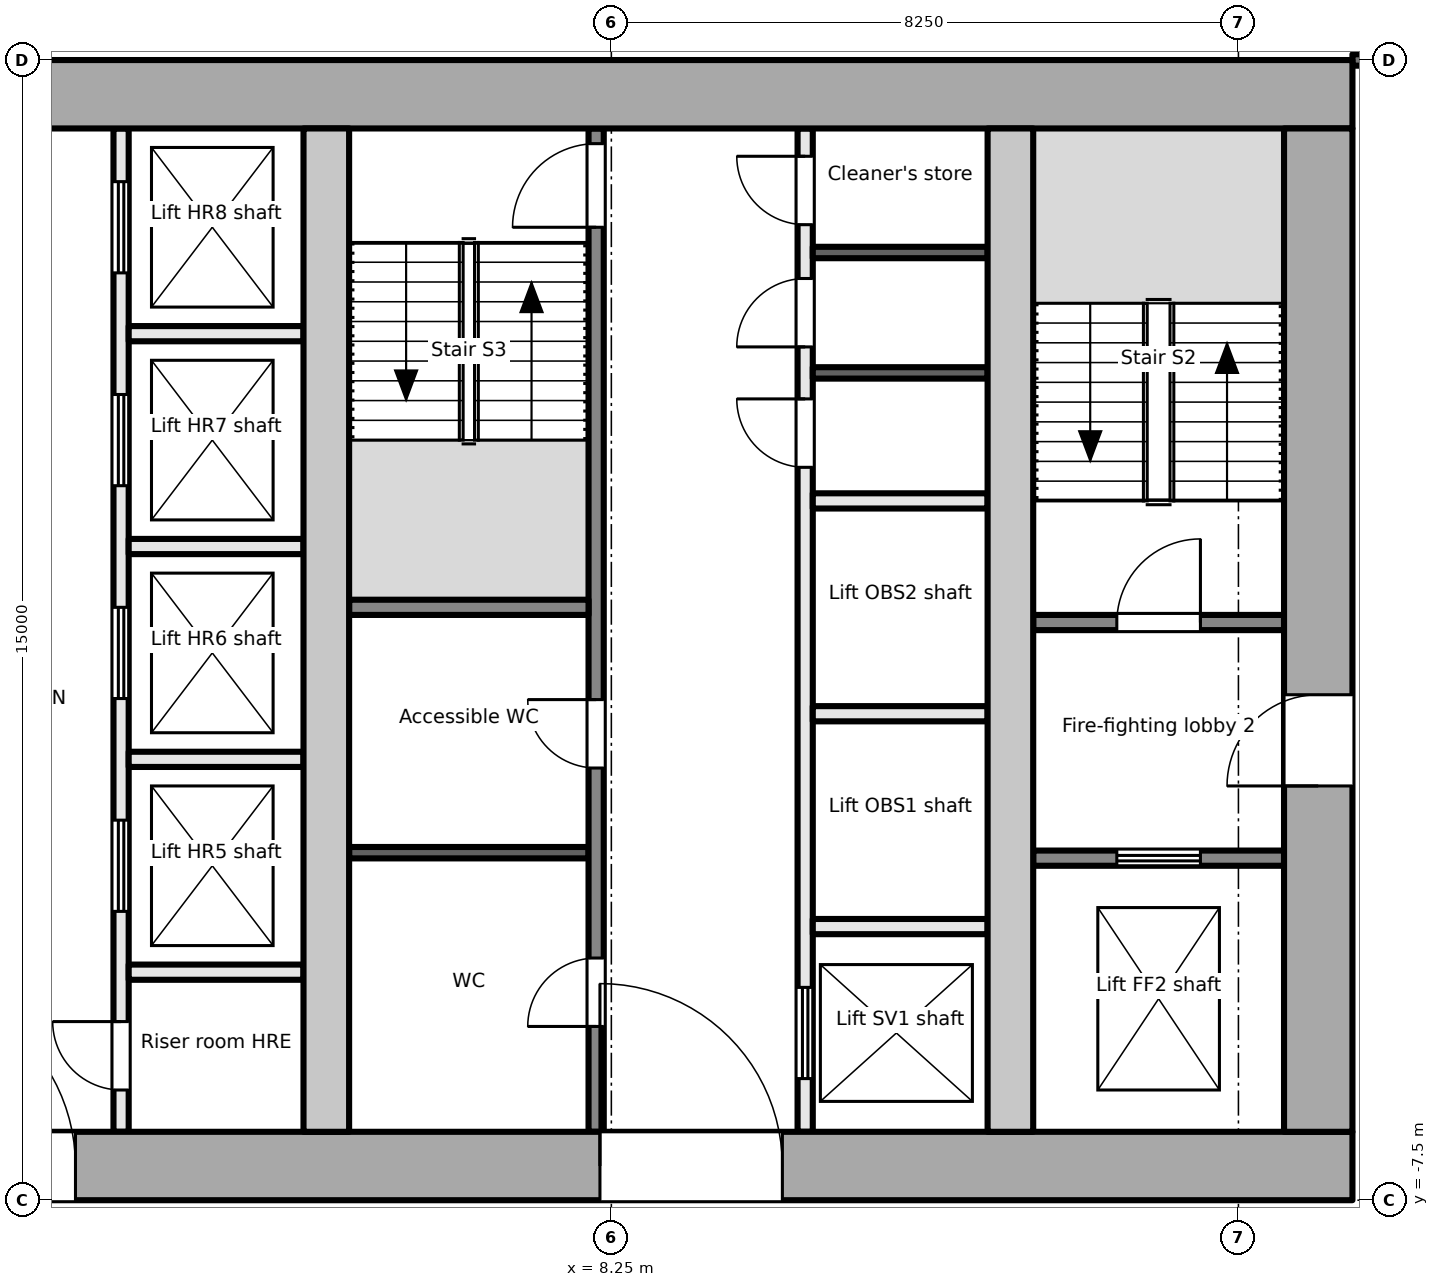
"""IFC4 building model, lengths in metres.
Left out: names, types, materials, properties, quantities, classifications, styles, units other than length and angle.
Written with IfcOpenShell. Run it as: python <this file> out.ifc"""

import sys

from ifc_helpers import new_model, si_unit, direction, frame, frame_2d, origin, place, context, subcontext, project, spatial, rectangle, extrude, element, fill, save


model = new_model("IFC4")
c1 = context("Model", 3, precision=1e-05, world=origin(), true_north=direction((0.0, 1.0)))
c2 = subcontext(c1, "Body", "Model", "MODEL_VIEW")
j1 = project(units=[si_unit("LENGTHUNIT", "METRE"), si_unit("PLANEANGLEUNIT", "RADIAN")], contexts=[c1])
p1 = place(None, origin())
s1 = spatial("IfcSite", under=j1, at=p1, CompositionType="ELEMENT")
p2 = place(p1, origin())
s2 = spatial("IfcBuilding", under=s1, at=p2, CompositionType="ELEMENT")
p3 = place(p2, frame((0.0, 0.0, 188.0)))
s3 = spatial("IfcBuildingStorey", under=s2, at=p3, CompositionType="ELEMENT", Elevation=188.0)
p4 = place(p3, frame((-18.0, -7.05, -0.2), z_axis=(0.0, 0.0, 1.0), x_axis=(1.0, 0.0, 0.0)))
e1 = element("IfcWall", 1, at=p4, inside=s3, PredefinedType="SHEAR", context=c2, shape_type="SweptSolid", body=[
    extrude(rectangle(XDim=36.0, YDim=0.9, at=frame_2d((18.0, 0.0))), origin(), (0.0, 0.0, 1.0), 3.9),
])
p5 = place(p4, frame((11.3, 0.0, 0.2)))
e2 = element("IfcOpeningElement", 2, at=p5, cuts=e1, PredefinedType="OPENING", context=c2, shape_type="SweptSolid", body=[
    extrude(rectangle(XDim=1.8, YDim=2.1, at=frame_2d((0.9, 1.05))), frame((0.0, 0.46, 0.0), z_axis=(0.0, -1.0, 0.0), x_axis=(1.0, 0.0, 0.0)), (0.0, 0.0, 1.0), 0.921),
])
p6 = place(p4, frame((16.8, 0.0, 0.2)))
e3 = element("IfcOpeningElement", 3, at=p6, cuts=e1, PredefinedType="OPENING", context=c2, shape_type="SweptSolid", body=[
    extrude(rectangle(XDim=2.4, YDim=2.1, at=frame_2d((1.2, 1.05))), frame((0.0, 0.46, 0.0), z_axis=(0.0, -1.0, 0.0), x_axis=(1.0, 0.0, 0.0)), (0.0, 0.0, 1.0), 0.921),
])
p7 = place(p4, frame((26.1, 0.0, 0.2)))
e4 = element("IfcOpeningElement", 4, at=p7, cuts=e1, PredefinedType="OPENING", context=c2, shape_type="SweptSolid", body=[
    extrude(rectangle(XDim=2.4, YDim=2.1, at=frame_2d((1.2, 1.05))), frame((0.0, 0.46, 0.0), z_axis=(0.0, -1.0, 0.0), x_axis=(1.0, 0.0, 0.0)), (0.0, 0.0, 1.0), 0.921),
])
p8 = place(p3, frame((-18.0, 7.05, -0.2), z_axis=(0.0, 0.0, 1.0), x_axis=(1.0, 0.0, 0.0)))
e5 = element("IfcWall", 5, at=p8, inside=s3, PredefinedType="SHEAR", context=c2, shape_type="SweptSolid", body=[
    extrude(rectangle(XDim=36.0, YDim=0.9, at=frame_2d((18.0, 0.0))), origin(), (0.0, 0.0, 1.0), 3.9),
])
p9 = place(p3, frame((17.55, -6.6, -0.2), z_axis=(0.0, 0.0, 1.0), x_axis=(0.0, 1.0, 0.0)))
e6 = element("IfcWall", 6, at=p9, inside=s3, PredefinedType="SHEAR", context=c2, shape_type="SweptSolid", body=[
    extrude(rectangle(XDim=13.2, YDim=0.9, at=frame_2d((6.6, 0.0))), origin(), (0.0, 0.0, 1.0), 3.9),
])
p10 = place(p9, frame((4.55, 0.0, 0.2)))
e7 = element("IfcOpeningElement", 7, at=p10, cuts=e6, PredefinedType="OPENING", context=c2, shape_type="SweptSolid", body=[
    extrude(rectangle(XDim=1.2, YDim=2.1, at=frame_2d((0.6, 1.05))), frame((0.0, 0.46, 0.0), z_axis=(0.0, -1.0, 0.0), x_axis=(1.0, 0.0, 0.0)), (0.0, 0.0, 1.0), 0.921),
])
for number, where, z_axis, x_axis in (
    (8, (4.5, -6.6, -0.2), (0.0, 0.0, 1.0), (0.0, 1.0, 0.0)),
    (9, (13.5, -6.6, -0.2), (0.0, 0.0, 1.0), (0.0, 1.0, 0.0)),
):
    element("IfcWall", number, at=place(p3, frame(where, z_axis=z_axis, x_axis=x_axis)), inside=s3, PredefinedType="SHEAR", context=c2, shape_type="SweptSolid", body=[
        extrude(rectangle(XDim=13.2, YDim=0.6, at=frame_2d((6.6, 0.0))), origin(), (0.0, 0.0, 1.0), 3.9),
    ])
p11 = place(p3, frame((13.8, -3.0, 0.0), z_axis=(0.0, 0.0, 1.0), x_axis=(1.0, 0.0, 0.0)))
e10 = element("IfcWall", 10, at=p11, inside=s3, PredefinedType="PARTITIONING", context=c2, shape_type="SweptSolid", body=[
    extrude(rectangle(XDim=3.3, YDim=0.2, at=frame_2d((1.65, 0.0))), origin(), (0.0, 0.0, 1.0), 3.7),
])
p12 = place(p11, frame((1.1, 0.0, 0.0)))
e11 = element("IfcOpeningElement", 11, at=p12, cuts=e10, PredefinedType="OPENING", context=c2, shape_type="SweptSolid", body=[
    extrude(rectangle(XDim=1.1, YDim=2.1, at=frame_2d((0.55, 1.05))), frame((0.0, 0.111, 0.0), z_axis=(0.0, -1.0, 0.0), x_axis=(1.0, 0.0, 0.0)), (0.0, 0.0, 1.0), 0.221),
])
p13 = place(p3, frame((13.8, 0.1, 0.0), z_axis=(0.0, 0.0, 1.0), x_axis=(1.0, 0.0, 0.0)))
e12 = element("IfcWall", 12, at=p13, inside=s3, PredefinedType="PARTITIONING", context=c2, shape_type="SweptSolid", body=[
    extrude(rectangle(XDim=3.3, YDim=0.2, at=frame_2d((1.65, 0.0))), origin(), (0.0, 0.0, 1.0), 3.7),
])
p14 = place(p13, frame((1.1, 0.0, 0.0)))
e13 = element("IfcOpeningElement", 13, at=p14, cuts=e12, PredefinedType="OPENING", context=c2, shape_type="SweptSolid", body=[
    extrude(rectangle(XDim=1.1, YDim=2.1, at=frame_2d((0.55, 1.05))), frame((0.0, 0.111, 0.0), z_axis=(0.0, -1.0, 0.0), x_axis=(1.0, 0.0, 0.0)), (0.0, 0.0, 1.0), 0.221),
])
p15 = place(p3, frame((1.8, -6.6, 0.0), z_axis=(0.0, 0.0, 1.0), x_axis=(0.0, 1.0, 0.0)))
e14 = element("IfcWall", 14, at=p15, inside=s3, PredefinedType="PARTITIONING", context=c2, shape_type="SweptSolid", body=[
    extrude(rectangle(XDim=13.2, YDim=0.2, at=frame_2d((6.6, 0.0))), origin(), (0.0, 0.0, 1.0), 3.7),
])
p16 = place(p15, frame((0.55, 0.0, 0.0)))
e15 = element("IfcOpeningElement", 15, at=p16, cuts=e14, PredefinedType="OPENING", context=c2, shape_type="SweptSolid", body=[
    extrude(rectangle(XDim=0.9, YDim=2.1, at=frame_2d((0.45, 1.05))), frame((0.0, 0.111, 0.0), z_axis=(0.0, -1.0, 0.0), x_axis=(1.0, 0.0, 0.0)), (0.0, 0.0, 1.0), 0.221),
])
p17 = place(p15, frame((2.9, 0.0, 0.0)))
e16 = element("IfcOpeningElement", 16, at=p17, cuts=e14, PredefinedType="OPENING", context=c2, shape_type="SweptSolid", body=[
    extrude(rectangle(XDim=1.2, YDim=2.1, at=frame_2d((0.6, 1.05))), frame((0.0, 0.111, 0.0), z_axis=(0.0, -1.0, 0.0), x_axis=(1.0, 0.0, 0.0)), (0.0, 0.0, 1.0), 0.221),
])
p18 = place(p15, frame((5.7, 0.0, 0.0)))
e17 = element("IfcOpeningElement", 17, at=p18, cuts=e14, PredefinedType="OPENING", context=c2, shape_type="SweptSolid", body=[
    extrude(rectangle(XDim=1.2, YDim=2.1, at=frame_2d((0.6, 1.05))), frame((0.0, 0.111, 0.0), z_axis=(0.0, -1.0, 0.0), x_axis=(1.0, 0.0, 0.0)), (0.0, 0.0, 1.0), 0.221),
])
p19 = place(p15, frame((8.5, 0.0, 0.0)))
e18 = element("IfcOpeningElement", 18, at=p19, cuts=e14, PredefinedType="OPENING", context=c2, shape_type="SweptSolid", body=[
    extrude(rectangle(XDim=1.2, YDim=2.1, at=frame_2d((0.6, 1.05))), frame((0.0, 0.111, 0.0), z_axis=(0.0, -1.0, 0.0), x_axis=(1.0, 0.0, 0.0)), (0.0, 0.0, 1.0), 0.221),
])
p20 = place(p15, frame((11.3, 0.0, 0.0)))
e19 = element("IfcOpeningElement", 19, at=p20, cuts=e14, PredefinedType="OPENING", context=c2, shape_type="SweptSolid", body=[
    extrude(rectangle(XDim=1.2, YDim=2.1, at=frame_2d((0.6, 1.05))), frame((0.0, 0.111, 0.0), z_axis=(0.0, -1.0, 0.0), x_axis=(1.0, 0.0, 0.0)), (0.0, 0.0, 1.0), 0.221),
])
for number, where, z_axis, x_axis in (
    (20, (1.9, -1.7, 0.0), (0.0, 0.0, 1.0), (1.0, 0.0, 0.0)),
    (21, (1.9, 1.1, 0.0), (0.0, 0.0, 1.0), (1.0, 0.0, 0.0)),
    (22, (1.9, 3.9, 0.0), (0.0, 0.0, 1.0), (1.0, 0.0, 0.0)),
    (23, (1.9, -4.5, 0.0), (0.0, 0.0, 1.0), (1.0, 0.0, 0.0)),
):
    element("IfcWall", number, at=place(p3, frame(where, z_axis=z_axis, x_axis=x_axis)), inside=s3, PredefinedType="PARTITIONING", context=c2, shape_type="SweptSolid", body=[
        extrude(rectangle(XDim=2.3, YDim=0.2, at=frame_2d((1.15, 0.0))), origin(), (0.0, 0.0, 1.0), 3.7),
    ])
p21 = place(p3, frame((8.05, -6.6, 0.0), z_axis=(0.0, 0.0, 1.0), x_axis=(0.0, 1.0, 0.0)))
e24 = element("IfcWall", 24, at=p21, inside=s3, PredefinedType="PARTITIONING", context=c2, shape_type="SweptSolid", body=[
    extrude(rectangle(XDim=13.2, YDim=0.2, at=frame_2d((6.6, 0.0))), origin(), (0.0, 0.0, 1.0), 3.7),
])
p22 = place(p21, frame((1.386, 0.0, 0.0)))
e25 = element("IfcOpeningElement", 25, at=p22, cuts=e24, PredefinedType="OPENING", context=c2, shape_type="SweptSolid", body=[
    extrude(rectangle(XDim=0.9, YDim=2.1, at=frame_2d((0.45, 1.05))), frame((0.0, 0.111, 0.0), z_axis=(0.0, -1.0, 0.0), x_axis=(1.0, 0.0, 0.0)), (0.0, 0.0, 1.0), 0.221),
])
p23 = place(p21, frame((4.786, 0.0, 0.0)))
e26 = element("IfcOpeningElement", 26, at=p23, cuts=e24, PredefinedType="OPENING", context=c2, shape_type="SweptSolid", body=[
    extrude(rectangle(XDim=0.9, YDim=2.1, at=frame_2d((0.45, 1.05))), frame((0.0, 0.111, 0.0), z_axis=(0.0, -1.0, 0.0), x_axis=(1.0, 0.0, 0.0)), (0.0, 0.0, 1.0), 0.221),
])
p24 = place(p21, frame((11.9, 0.0, 0.0)))
e27 = element("IfcOpeningElement", 27, at=p24, cuts=e24, PredefinedType="OPENING", context=c2, shape_type="SweptSolid", body=[
    extrude(rectangle(XDim=1.1, YDim=2.1, at=frame_2d((0.55, 1.05))), frame((0.0, 0.111, 0.0), z_axis=(0.0, -1.0, 0.0), x_axis=(1.0, 0.0, 0.0)), (0.0, 0.0, 1.0), 0.221),
])
p25 = place(p3, frame((10.8, -6.6, 0.0), z_axis=(0.0, 0.0, 1.0), x_axis=(0.0, 1.0, 0.0)))
e28 = element("IfcWall", 28, at=p25, inside=s3, PredefinedType="PARTITIONING", context=c2, shape_type="SweptSolid", body=[
    extrude(rectangle(XDim=13.2, YDim=0.2, at=frame_2d((6.6, 0.0))), origin(), (0.0, 0.0, 1.0), 3.7),
])
p26 = place(p25, frame((0.7, 0.0, 0.0)))
e29 = element("IfcOpeningElement", 29, at=p26, cuts=e28, PredefinedType="OPENING", context=c2, shape_type="SweptSolid", body=[
    extrude(rectangle(XDim=1.2, YDim=2.1, at=frame_2d((0.6, 1.05))), frame((0.0, 0.111, 0.0), z_axis=(0.0, -1.0, 0.0), x_axis=(1.0, 0.0, 0.0)), (0.0, 0.0, 1.0), 0.221),
])
p27 = place(p25, frame((8.742, 0.0, 0.0)))
e30 = element("IfcOpeningElement", 30, at=p27, cuts=e28, PredefinedType="OPENING", context=c2, shape_type="SweptSolid", body=[
    extrude(rectangle(XDim=0.9, YDim=2.1, at=frame_2d((0.45, 1.05))), frame((0.0, 0.111, 0.0), z_axis=(0.0, -1.0, 0.0), x_axis=(1.0, 0.0, 0.0)), (0.0, 0.0, 1.0), 0.221),
])
p28 = place(p25, frame((10.326, 0.0, 0.0)))
e31 = element("IfcOpeningElement", 31, at=p28, cuts=e28, PredefinedType="OPENING", context=c2, shape_type="SweptSolid", body=[
    extrude(rectangle(XDim=0.9, YDim=2.1, at=frame_2d((0.45, 1.05))), frame((0.0, 0.111, 0.0), z_axis=(0.0, -1.0, 0.0), x_axis=(1.0, 0.0, 0.0)), (0.0, 0.0, 1.0), 0.221),
])
p29 = place(p25, frame((11.934, 0.0, 0.0)))
e32 = element("IfcOpeningElement", 32, at=p29, cuts=e28, PredefinedType="OPENING", context=c2, shape_type="SweptSolid", body=[
    extrude(rectangle(XDim=0.9, YDim=2.1, at=frame_2d((0.45, 1.05))), frame((0.0, 0.111, 0.0), z_axis=(0.0, -1.0, 0.0), x_axis=(1.0, 0.0, 0.0)), (0.0, 0.0, 1.0), 0.221),
])
p30 = place(p3, frame((4.8, 0.3, 0.0), z_axis=(0.0, 0.0, 1.0), x_axis=(1.0, 0.0, 0.0)))
e33 = element("IfcWall", 33, at=p30, inside=s3, PredefinedType="PARTITIONING", context=c2, shape_type="SweptSolid", body=[
    extrude(rectangle(XDim=3.15, YDim=0.2, at=frame_2d((1.575, 0.0))), origin(), (0.0, 0.0, 1.0), 3.7),
])
p31 = place(p3, frame((4.8, -2.928, 0.0), z_axis=(0.0, 0.0, 1.0), x_axis=(1.0, 0.0, 0.0)))
e34 = element("IfcWall", 34, at=p31, inside=s3, PredefinedType="PARTITIONING", context=c2, shape_type="SweptSolid", body=[
    extrude(rectangle(XDim=3.15, YDim=0.15, at=frame_2d((1.575, 0.0))), origin(), (0.0, 0.0, 1.0), 3.7),
])
for number, where, z_axis, x_axis in (
    (35, (10.9, -3.9, 0.0), (0.0, 0.0, 1.0), (1.0, 0.0, 0.0)),
    (36, (10.9, -1.1, 0.0), (0.0, 0.0, 1.0), (1.0, 0.0, 0.0)),
    (37, (10.9, 1.7, 0.0), (0.0, 0.0, 1.0), (1.0, 0.0, 0.0)),
):
    element("IfcWall", number, at=place(p3, frame(where, z_axis=z_axis, x_axis=x_axis)), inside=s3, PredefinedType="PARTITIONING", context=c2, shape_type="SweptSolid", body=[
        extrude(rectangle(XDim=2.3, YDim=0.2, at=frame_2d((1.15, 0.0))), origin(), (0.0, 0.0, 1.0), 3.7),
    ])
for number, where, z_axis, x_axis in (
    (38, (10.9, 3.384, 0.0), (0.0, 0.0, 1.0), (1.0, 0.0, 0.0)),
    (39, (10.9, 4.968, 0.0), (0.0, 0.0, 1.0), (1.0, 0.0, 0.0)),
):
    element("IfcWall", number, at=place(p3, frame(where, z_axis=z_axis, x_axis=x_axis)), inside=s3, PredefinedType="PARTITIONING", context=c2, shape_type="SweptSolid", body=[
        extrude(rectangle(XDim=2.3, YDim=0.15, at=frame_2d((1.15, 0.0))), origin(), (0.0, 0.0, 1.0), 3.7),
    ])
p32 = place(p3, frame((18.0, 7.501, 0.0), z_axis=(0.0, 0.0, 1.0), x_axis=(1.0, 0.0, 0.0)))
e40 = element("IfcWall", 40, at=p32, inside=s3, PredefinedType="PARTITIONING", context=c2, shape_type="SweptSolid", body=[
    extrude(rectangle(XDim=2.624, YDim=0.15, at=frame_2d((1.312, 0.0))), origin(), (0.0, 0.0, 1.0), 3.7),
])
p33 = place(p12, origin())
e41 = element("IfcDoor", 41, at=p33, inside=s3, OperationType="DOUBLE_DOOR_SLIDING", PredefinedType="DOOR", context=c2, shape_type="SweptSolid", body=[
    extrude(rectangle(XDim=1.1, YDim=2.1, at=frame_2d((0.55, 1.05))), frame((0.0, 0.025, 0.0), z_axis=(0.0, -1.0, 0.0), x_axis=(1.0, 0.0, 0.0)), (0.0, 0.0, 1.0), 0.05),
])
fill(e11, e41)
p34 = place(p10, origin())
e42 = element("IfcDoor", 42, at=p34, inside=s3, OperationType="SINGLE_SWING_LEFT", PredefinedType="DOOR", context=c2, shape_type="SweptSolid", body=[
    extrude(rectangle(XDim=1.2, YDim=2.1, at=frame_2d((0.6, 1.05))), frame((0.0, 0.025, 0.0), z_axis=(0.0, -1.0, 0.0), x_axis=(1.0, 0.0, 0.0)), (0.0, 0.0, 1.0), 0.05),
])
fill(e7, e42)
p35 = place(p14, origin())
e43 = element("IfcDoor", 43, at=p35, inside=s3, OperationType="SINGLE_SWING_RIGHT", PredefinedType="DOOR", context=c2, shape_type="SweptSolid", body=[
    extrude(rectangle(XDim=1.1, YDim=2.1, at=frame_2d((0.55, 1.05))), frame((0.0, 0.025, 0.0), z_axis=(0.0, -1.0, 0.0), x_axis=(1.0, 0.0, 0.0)), (0.0, 0.0, 1.0), 0.05),
])
fill(e13, e43)
p36 = place(p16, origin())
e44 = element("IfcDoor", 44, at=p36, inside=s3, OperationType="SINGLE_SWING_RIGHT", PredefinedType="DOOR", context=c2, shape_type="SweptSolid", body=[
    extrude(rectangle(XDim=0.9, YDim=2.1, at=frame_2d((0.45, 1.05))), frame((0.0, 0.025, 0.0), z_axis=(0.0, -1.0, 0.0), x_axis=(1.0, 0.0, 0.0)), (0.0, 0.0, 1.0), 0.05),
])
fill(e15, e44)
p37 = place(p17, origin())
e45 = element("IfcDoor", 45, at=p37, inside=s3, OperationType="DOUBLE_DOOR_SLIDING", PredefinedType="DOOR", context=c2, shape_type="SweptSolid", body=[
    extrude(rectangle(XDim=1.2, YDim=2.1, at=frame_2d((0.6, 1.05))), frame((0.0, 0.025, 0.0), z_axis=(0.0, -1.0, 0.0), x_axis=(1.0, 0.0, 0.0)), (0.0, 0.0, 1.0), 0.05),
])
fill(e16, e45)
p38 = place(p18, origin())
e46 = element("IfcDoor", 46, at=p38, inside=s3, OperationType="DOUBLE_DOOR_SLIDING", PredefinedType="DOOR", context=c2, shape_type="SweptSolid", body=[
    extrude(rectangle(XDim=1.2, YDim=2.1, at=frame_2d((0.6, 1.05))), frame((0.0, 0.025, 0.0), z_axis=(0.0, -1.0, 0.0), x_axis=(1.0, 0.0, 0.0)), (0.0, 0.0, 1.0), 0.05),
])
fill(e17, e46)
p39 = place(p19, origin())
e47 = element("IfcDoor", 47, at=p39, inside=s3, OperationType="DOUBLE_DOOR_SLIDING", PredefinedType="DOOR", context=c2, shape_type="SweptSolid", body=[
    extrude(rectangle(XDim=1.2, YDim=2.1, at=frame_2d((0.6, 1.05))), frame((0.0, 0.025, 0.0), z_axis=(0.0, -1.0, 0.0), x_axis=(1.0, 0.0, 0.0)), (0.0, 0.0, 1.0), 0.05),
])
fill(e18, e47)
p40 = place(p20, origin())
e48 = element("IfcDoor", 48, at=p40, inside=s3, OperationType="DOUBLE_DOOR_SLIDING", PredefinedType="DOOR", context=c2, shape_type="SweptSolid", body=[
    extrude(rectangle(XDim=1.2, YDim=2.1, at=frame_2d((0.6, 1.05))), frame((0.0, 0.025, 0.0), z_axis=(0.0, -1.0, 0.0), x_axis=(1.0, 0.0, 0.0)), (0.0, 0.0, 1.0), 0.05),
])
fill(e19, e48)
p41 = place(p6, origin())
e49 = element("IfcDoor", 49, at=p41, inside=s3, OperationType="DOUBLE_DOOR_DOUBLE_SWING", PredefinedType="DOOR", context=c2, shape_type="SweptSolid", body=[
    extrude(rectangle(XDim=2.4, YDim=2.1, at=frame_2d((1.2, 1.05))), frame((0.0, 0.025, 0.0), z_axis=(0.0, -1.0, 0.0), x_axis=(1.0, 0.0, 0.0)), (0.0, 0.0, 1.0), 0.05),
])
fill(e3, e49)
p42 = place(p22, origin())
e50 = element("IfcDoor", 50, at=p42, inside=s3, OperationType="SINGLE_SWING_LEFT", PredefinedType="DOOR", context=c2, shape_type="SweptSolid", body=[
    extrude(rectangle(XDim=0.9, YDim=2.1, at=frame_2d((0.45, 1.05))), frame((0.0, 0.025, 0.0), z_axis=(0.0, -1.0, 0.0), x_axis=(1.0, 0.0, 0.0)), (0.0, 0.0, 1.0), 0.05),
])
fill(e25, e50)
p43 = place(p23, origin())
e51 = element("IfcDoor", 51, at=p43, inside=s3, OperationType="SINGLE_SWING_RIGHT", PredefinedType="DOOR", context=c2, shape_type="SweptSolid", body=[
    extrude(rectangle(XDim=0.9, YDim=2.1, at=frame_2d((0.45, 1.05))), frame((0.0, 0.025, 0.0), z_axis=(0.0, -1.0, 0.0), x_axis=(1.0, 0.0, 0.0)), (0.0, 0.0, 1.0), 0.05),
])
fill(e26, e51)
p44 = place(p24, origin())
e52 = element("IfcDoor", 52, at=p44, inside=s3, OperationType="SINGLE_SWING_LEFT", PredefinedType="DOOR", context=c2, shape_type="SweptSolid", body=[
    extrude(rectangle(XDim=1.1, YDim=2.1, at=frame_2d((0.55, 1.05))), frame((0.0, 0.025, 0.0), z_axis=(0.0, -1.0, 0.0), x_axis=(1.0, 0.0, 0.0)), (0.0, 0.0, 1.0), 0.05),
])
fill(e27, e52)
p45 = place(p7, origin())
e53 = element("IfcDoor", 53, at=p45, inside=s3, OperationType="DOUBLE_DOOR_DOUBLE_SWING", PredefinedType="DOOR", context=c2, shape_type="SweptSolid", body=[
    extrude(rectangle(XDim=2.4, YDim=2.1, at=frame_2d((1.2, 1.05))), frame((0.0, 0.025, 0.0), z_axis=(0.0, -1.0, 0.0), x_axis=(1.0, 0.0, 0.0)), (0.0, 0.0, 1.0), 0.05),
])
fill(e4, e53)
p46 = place(p26, origin())
e54 = element("IfcDoor", 54, at=p46, inside=s3, OperationType="DOUBLE_DOOR_SLIDING", PredefinedType="DOOR", context=c2, shape_type="SweptSolid", body=[
    extrude(rectangle(XDim=1.2, YDim=2.1, at=frame_2d((0.6, 1.05))), frame((0.0, 0.025, 0.0), z_axis=(0.0, -1.0, 0.0), x_axis=(1.0, 0.0, 0.0)), (0.0, 0.0, 1.0), 0.05),
])
fill(e29, e54)
p47 = place(p27, origin())
e55 = element("IfcDoor", 55, at=p47, inside=s3, OperationType="SINGLE_SWING_RIGHT", PredefinedType="DOOR", context=c2, shape_type="SweptSolid", body=[
    extrude(rectangle(XDim=0.9, YDim=2.1, at=frame_2d((0.45, 1.05))), frame((0.0, 0.025, 0.0), z_axis=(0.0, -1.0, 0.0), x_axis=(1.0, 0.0, 0.0)), (0.0, 0.0, 1.0), 0.05),
])
fill(e30, e55)
p48 = place(p28, origin())
e56 = element("IfcDoor", 56, at=p48, inside=s3, OperationType="SINGLE_SWING_LEFT", PredefinedType="DOOR", context=c2, shape_type="SweptSolid", body=[
    extrude(rectangle(XDim=0.9, YDim=2.1, at=frame_2d((0.45, 1.05))), frame((0.0, 0.025, 0.0), z_axis=(0.0, -1.0, 0.0), x_axis=(1.0, 0.0, 0.0)), (0.0, 0.0, 1.0), 0.05),
])
fill(e31, e56)
p49 = place(p29, origin())
e57 = element("IfcDoor", 57, at=p49, inside=s3, OperationType="SINGLE_SWING_RIGHT", PredefinedType="DOOR", context=c2, shape_type="SweptSolid", body=[
    extrude(rectangle(XDim=0.9, YDim=2.1, at=frame_2d((0.45, 1.05))), frame((0.0, 0.025, 0.0), z_axis=(0.0, -1.0, 0.0), x_axis=(1.0, 0.0, 0.0)), (0.0, 0.0, 1.0), 0.05),
])
fill(e32, e57)
save(model, sys.argv[1])
